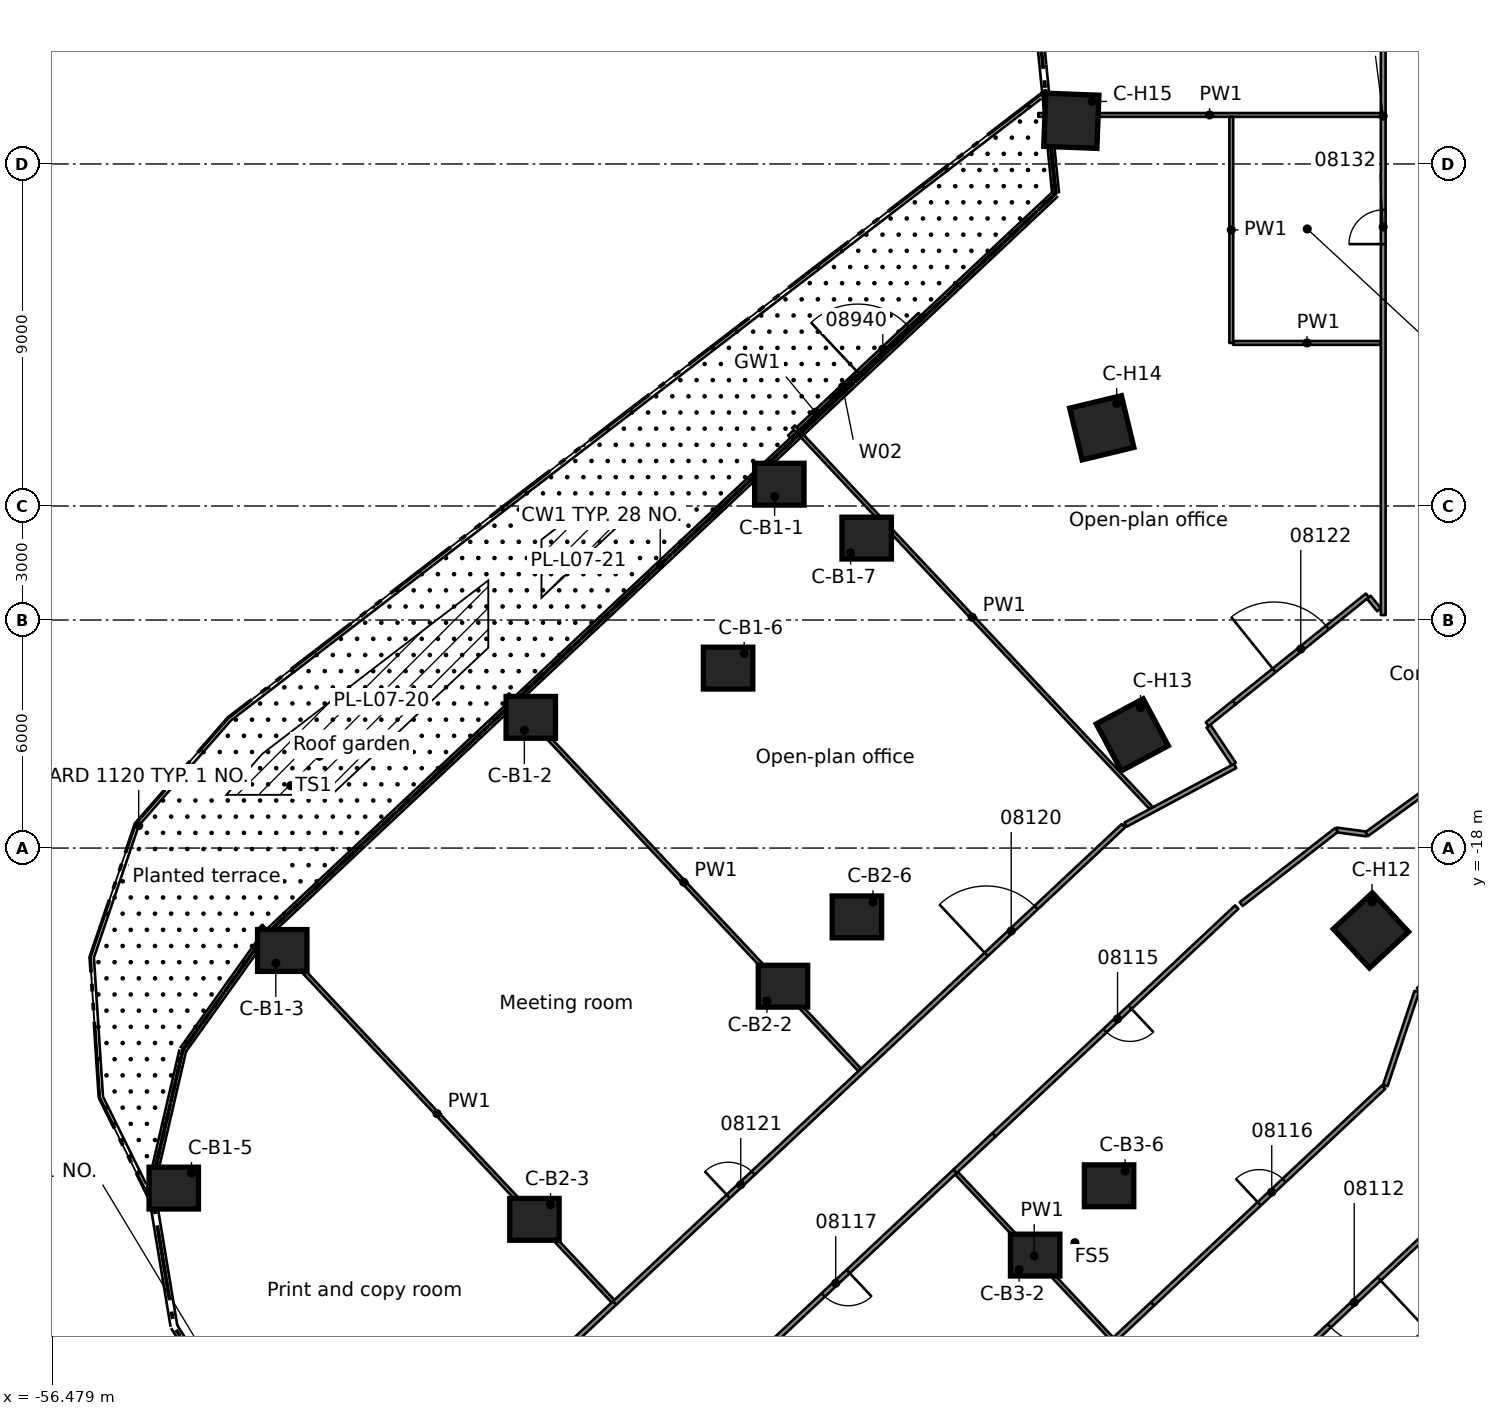
"""IFC4 building model, lengths in metres.
Left out: names, types, materials, properties, quantities, classifications, styles, units other than length and angle.
Written with IfcOpenShell. Run it as: python <this file> out.ifc"""

import sys

from ifc_helpers import new_model, si_unit, direction, frame, frame_2d, origin, origin_2d, place, context, subcontext, project, spatial, rectangle, extrude, element, fill, save


model = new_model("IFC4")
c1 = context("Model", 3, precision=1e-05, world=origin(), true_north=direction((0.0, 1.0)))
c2 = subcontext(c1, "Body", "Model", "MODEL_VIEW")
j1 = project(units=[si_unit("LENGTHUNIT", "METRE"), si_unit("PLANEANGLEUNIT", "RADIAN")], contexts=[c1])
p1 = place(None, origin())
s1 = spatial("IfcSite", under=j1, at=p1, CompositionType="ELEMENT")
p2 = place(p1, origin())
s2 = spatial("IfcBuilding", under=s1, at=p2, CompositionType="ELEMENT")
p3 = place(p2, frame((0.0, 0.0, 37.3)))
s3 = spatial("IfcBuildingStorey", under=s2, at=p3, CompositionType="ELEMENT", Elevation=37.3)
for number, where, z_axis, x_axis in (
    (1, (-37.341, -8.426, 0.0), (0.0, 0.0, 1.0), (1.0, 0.0, 0.0)),
    (2, (-43.881, -14.561, 0.0), (0.0, 0.0, 1.0), (1.0, 0.0, 0.0)),
    (3, (-50.421, -20.695, 0.0), (0.0, 0.0, 1.0), (1.0, 0.0, 0.0)),
    (4, (-53.276, -26.947, 0.0), (0.0, 0.0, 1.0), (1.0, 0.0, 0.0)),
    (5, (-38.689, -13.265, 0.0), (0.0, 0.0, 1.0), (1.0, 0.0, 0.0)),
    (6, (-35.042, -9.844, 0.0), (0.0, 0.0, 1.0), (1.0, 0.0, 0.0)),
    (7, (-37.245, -21.635, 0.0), (0.0, 0.0, 1.0), (1.0, 0.0, 0.0)),
    (8, (-43.785, -27.77, 0.0), (0.0, 0.0, 1.0), (1.0, 0.0, 0.0)),
    (9, (-35.3, -19.811, 0.0), (0.0, 0.0, 1.0), (1.0, 0.0, 0.0)),
    (10, (-30.609, -28.71, 0.0), (0.0, 0.0, 1.0), (1.0, 0.0, 0.0)),
    (11, (-28.664, -26.886, 0.0), (0.0, 0.0, 1.0), (1.0, 0.0, 0.0)),
):
    element("IfcColumn", number, at=place(p3, frame(where, z_axis=z_axis, x_axis=x_axis)), inside=s3, PredefinedType="COLUMN", context=c2, shape_type="SweptSolid", body=[
        extrude(rectangle(XDim=1.3, YDim=1.1, at=origin_2d()), origin(), (0.0, 0.0, 1.0), 3.5),
    ])
for number, where, z_axis, x_axis in (
    (12, (-21.774, -20.167, 0.0), (0.0, 0.0, 1.0), (-0.734, -0.68, 0.0)),
    (13, (-28.054, -15.021, 0.0), (0.0, 0.0, 1.0), (-0.882, -0.472, 0.0)),
    (14, (-28.856, -6.942, 0.0), (0.0, 0.0, 1.0), (-0.972, -0.234, 0.0)),
    (15, (-29.657, 1.136, 0.0), (0.0, 0.0, 1.0), (-0.999, 0.038, 0.0)),
):
    element("IfcColumn", number, at=place(p3, frame(where, z_axis=z_axis, x_axis=x_axis)), inside=s3, PredefinedType="COLUMN", context=c2, shape_type="SweptSolid", body=[
        extrude(rectangle(XDim=1.4, YDim=1.4, at=origin_2d()), origin(), (0.0, 0.0, 1.0), 3.5),
    ])
p4 = place(p3, frame((-37.077, -7.178, 0.0), z_axis=(0.0, 0.0, 1.0), x_axis=(0.729367283299, 0.684122332667, 0.0)))
e16 = element("IfcWall", 16, at=p4, inside=s3, PredefinedType="STANDARD", context=c2, shape_type="SweptSolid", body=[
    extrude(rectangle(XDim=4.705, YDim=0.1, at=frame_2d((2.353, 0.0))), origin(), (0.0, 0.0, 1.0), 3.08),
])
p5 = place(p4, frame((2.472, 0.0, 0.0)))
e17 = element("IfcOpeningElement", 17, at=p5, cuts=e16, PredefinedType="OPENING", context=c2, shape_type="SweptSolid", body=[
    extrude(rectangle(XDim=1.8, YDim=2.4, at=frame_2d((0.9, 1.2))), frame((0.0, 0.06, 0.0), z_axis=(0.0, -1.0, 0.0), x_axis=(1.0, 0.0, 0.0)), (0.0, 0.0, 1.0), 0.12),
])
p6 = place(p4, frame((1.472, 0.0, 0.0)))
e18 = element("IfcOpeningElement", 18, at=p6, cuts=e16, PredefinedType="OPENING", context=c2, shape_type="SweptSolid", body=[
    extrude(rectangle(XDim=0.9, YDim=2.4, at=frame_2d((0.45, 1.2))), frame((0.0, 0.06, 0.0), z_axis=(0.0, -1.0, 0.0), x_axis=(1.0, 0.0, 0.0)), (0.0, 0.0, 1.0), 0.12),
])
p7 = place(p3, frame((-25.382, -15.788, 0.0), z_axis=(0.0, 0.0, 1.0), x_axis=(-0.556395946592, 0.830917294691, 0.0)))
e19 = element("IfcWall", 19, at=p7, inside=s3, PredefinedType="PARTITIONING", context=c2, shape_type="SweptSolid", body=[
    extrude(rectangle(XDim=1.195, YDim=0.125, at=frame_2d((0.598, 0.0))), origin(), (0.0, 0.0, 1.0), 3.06),
])
p8 = place(p3, frame((-22.677, -17.524, 0.0), z_axis=(0.0, 0.0, 1.0), x_axis=(0.991054476668, -0.133457949465, 0.0)))
e20 = element("IfcWall", 20, at=p8, inside=s3, PredefinedType="PARTITIONING", context=c2, shape_type="SweptSolid", body=[
    extrude(rectangle(XDim=0.803, YDim=0.125, at=frame_2d((0.401, 0.0))), origin(), (0.0, 0.0, 1.0), 3.06),
])
p9 = place(p3, frame((-21.828, -11.401, 0.0), z_axis=(0.0, 0.0, 1.0), x_axis=(0.628685146217, -0.777659942987, 0.0)))
e21 = element("IfcWall", 21, at=p9, inside=s3, PredefinedType="PARTITIONING", context=c2, shape_type="SweptSolid", body=[
    extrude(rectangle(XDim=0.425, YDim=0.125, at=frame_2d((0.212, 0.0))), origin(), (0.0, 0.0, 1.0), 3.06),
])
p10 = place(p3, frame((-50.979, -20.052, 0.0), z_axis=(0.0, 0.0, 1.0), x_axis=(0.684137881392, -0.729352698798, 0.0)))
e22 = element("IfcWall", 22, at=p10, inside=s3, PredefinedType="PARTITIONING", context=c2, shape_type="SweptSolid", body=[
    extrude(rectangle(XDim=13.537, YDim=0.1, at=frame_2d((6.768, 0.0))), origin(), (0.0, 0.0, 1.0), 3.06),
])
p11 = place(p3, frame((-44.487, -13.963, 0.0), z_axis=(0.0, 0.0, 1.0), x_axis=(0.684099502381, -0.729388696678, 0.0)))
e23 = element("IfcWall", 23, at=p11, inside=s3, PredefinedType="PARTITIONING", context=c2, shape_type="SweptSolid", body=[
    extrude(rectangle(XDim=13.536, YDim=0.1, at=frame_2d((6.768, 0.0))), origin(), (0.0, 0.0, 1.0), 3.06),
])
p12 = place(p3, frame((-32.677, -26.556, 0.0), z_axis=(0.0, 0.0, 1.0), x_axis=(0.684221226116, -0.729274511918, 0.0)))
e24 = element("IfcWall", 24, at=p12, inside=s3, PredefinedType="PARTITIONING", context=c2, shape_type="SweptSolid", body=[
    extrude(rectangle(XDim=5.972, YDim=0.1, at=frame_2d((2.986, 0.0))), origin(), (0.0, 0.0, 1.0), 3.06),
])
p13 = place(p3, frame((-36.97, -6.912, 0.0), z_axis=(0.0, 0.0, 1.0), x_axis=(0.684169085262, -0.729323428098, 0.0)))
e25 = element("IfcWall", 25, at=p13, inside=s3, PredefinedType="PARTITIONING", context=c2, shape_type="SweptSolid", body=[
    extrude(rectangle(XDim=13.75, YDim=0.1, at=frame_2d((6.875, 0.0))), origin(), (0.0, 0.0, 1.0), 3.06),
])
p14 = place(p3, frame((-25.398, -4.709, 0.0), z_axis=(0.0, 0.0, 1.0), x_axis=(1.0, 0.0, 0.0)))
e26 = element("IfcWall", 26, at=p14, inside=s3, PredefinedType="PARTITIONING", context=c2, shape_type="SweptSolid", body=[
    extrude(rectangle(XDim=3.886, YDim=0.1, at=frame_2d((1.943, 0.0))), origin(), (0.0, 0.0, 1.0), 3.06),
])
p15 = place(p3, frame((-30.527, 1.29, 0.0), z_axis=(0.0, 0.0, 1.0), x_axis=(1.0, 0.0, 0.0)))
e27 = element("IfcWall", 27, at=p15, inside=s3, PredefinedType="PARTITIONING", context=c2, shape_type="SweptSolid", body=[
    extrude(rectangle(XDim=9.015, YDim=0.1, at=frame_2d((4.508, 0.0))), origin(), (0.0, 0.0, 1.0), 3.06),
])
p16 = place(p3, frame((-25.347, -15.84, 0.0), z_axis=(0.0, 0.0, 1.0), x_axis=(-0.881616399283, -0.471966656147, 0.0)))
e28 = element("IfcWall", 28, at=p16, inside=s3, PredefinedType="PARTITIONING", context=c2, shape_type="SweptSolid", body=[
    extrude(rectangle(XDim=3.271, YDim=0.125, at=frame_2d((1.636, 0.0))), origin(), (0.0, 0.0, 1.0), 3.06),
])
p17 = place(p3, frame((-25.187, -19.474, 0.0), z_axis=(0.0, 0.0, 1.0), x_axis=(0.789430829464, 0.613839527476, 0.0)))
e29 = element("IfcWall", 29, at=p17, inside=s3, PredefinedType="PARTITIONING", context=c2, shape_type="SweptSolid", body=[
    extrude(rectangle(XDim=3.177, YDim=0.125, at=frame_2d((1.588, 0.0))), origin(), (0.0, 0.0, 1.0), 3.06),
])
p18 = place(p3, frame((-25.373, -14.172, 0.0), z_axis=(0.0, 0.0, 1.0), x_axis=(0.779219787028, 0.626750766657, 0.0)))
e30 = element("IfcWall", 30, at=p18, inside=s3, PredefinedType="PARTITIONING", context=c2, shape_type="SweptSolid", body=[
    extrude(rectangle(XDim=4.5, YDim=0.125, at=frame_2d((2.25, 0.0))), origin(), (0.0, 0.0, 1.0), 3.06),
])
p19 = place(p18, frame((1.35, 0.0, 0.0)))
e31 = element("IfcOpeningElement", 31, at=p19, cuts=e30, PredefinedType="OPENING", context=c2, shape_type="SweptSolid", body=[
    extrude(rectangle(XDim=1.8, YDim=2.1, at=frame_2d((0.9, 1.05))), frame((0.0, 0.073, 0.0), z_axis=(0.0, -1.0, 0.0), x_axis=(1.0, 0.0, 0.0)), (0.0, 0.0, 1.0), 0.145),
])
p20 = place(p3, frame((-26.082, -14.742, 0.0), z_axis=(0.0, 0.0, 1.0), x_axis=(0.779030886705, 0.626985548127, 0.0)))
e32 = element("IfcWall", 32, at=p20, inside=s3, PredefinedType="PARTITIONING", context=c2, shape_type="SweptSolid", body=[
    extrude(rectangle(XDim=0.909, YDim=0.125, at=frame_2d((0.455, 0.0))), origin(), (0.0, 0.0, 1.0), 3.06),
])
p21 = place(p3, frame((-20.085, -16.326, 0.0), z_axis=(0.0, 0.0, 1.0), x_axis=(-0.80897376901, -0.587844742304, 0.0)))
e33 = element("IfcWall", 33, at=p21, inside=s3, PredefinedType="PARTITIONING", context=c2, shape_type="SweptSolid", body=[
    extrude(rectangle(XDim=2.22, YDim=0.125, at=frame_2d((1.11, 0.0))), origin(), (0.0, 0.0, 1.0), 3.06),
])
p22 = place(p3, frame((-20.522, -21.733, 0.0), z_axis=(0.0, 0.0, 1.0), x_axis=(0.733842634203, 0.679319503788, 0.0)))
e34 = element("IfcWall", 34, at=p22, inside=s3, PredefinedType="PARTITIONING", context=c2, shape_type="SweptSolid", body=[
    extrude(rectangle(XDim=2.145, YDim=0.125, at=frame_2d((1.072, 0.0))), origin(), (0.0, 0.0, 1.0), 3.06),
])
p23 = place(p3, frame((-32.72, -26.508, 0.0), z_axis=(0.0, 0.0, 1.0), x_axis=(0.729721133243, 0.683744884953, 0.0)))
e35 = element("IfcWall", 35, at=p23, inside=s3, PredefinedType="PARTITIONING", context=c2, shape_type="SweptSolid", body=[
    extrude(rectangle(XDim=1.407, YDim=0.125, at=frame_2d((0.704, 0.0))), origin(), (0.0, 0.0, 1.0), 3.06),
])
p24 = place(p3, frame((-18.566, -26.532, 0.0), z_axis=(0.0, 0.0, 1.0), x_axis=(-0.729338488461, -0.684153030578, 0.0)))
e36 = element("IfcWall", 36, at=p24, inside=s3, PredefinedType="PARTITIONING", context=c2, shape_type="SweptSolid", body=[
    extrude(rectangle(XDim=19.122, YDim=0.125, at=frame_2d((9.561, 0.0))), origin(), (0.0, 0.0, 1.0), 3.06),
])
p25 = place(p24, frame((4.101, 0.0, 0.0)))
e37 = element("IfcOpeningElement", 37, at=p25, cuts=e36, PredefinedType="OPENING", context=c2, shape_type="SweptSolid", body=[
    extrude(rectangle(XDim=1.8, YDim=2.1, at=frame_2d((0.9, 1.05))), frame((0.0, 0.073, 0.0), z_axis=(0.0, -1.0, 0.0), x_axis=(1.0, 0.0, 0.0)), (0.0, 0.0, 1.0), 0.145),
])
p26 = place(p24, frame((11.908, 0.0, 0.0)))
e38 = element("IfcOpeningElement", 38, at=p26, cuts=e36, PredefinedType="OPENING", context=c2, shape_type="SweptSolid", body=[
    extrude(rectangle(XDim=1.0, YDim=2.1, at=frame_2d((0.5, 1.05))), frame((0.0, 0.073, 0.0), z_axis=(0.0, -1.0, 0.0), x_axis=(1.0, 0.0, 0.0)), (0.0, 0.0, 1.0), 0.145),
])
p27 = place(p24, frame((16.357, 0.0, 0.0)))
e39 = element("IfcOpeningElement", 39, at=p27, cuts=e36, PredefinedType="OPENING", context=c2, shape_type="SweptSolid", body=[
    extrude(rectangle(XDim=1.0, YDim=2.1, at=frame_2d((0.5, 1.05))), frame((0.0, 0.073, 0.0), z_axis=(0.0, -1.0, 0.0), x_axis=(1.0, 0.0, 0.0)), (0.0, 0.0, 1.0), 0.145),
])
p28 = place(p3, frame((-36.715, -38.619, 0.0), z_axis=(0.0, 0.0, 1.0), x_axis=(0.729354194338, 0.684136287008, 0.0)))
e40 = element("IfcWall", 40, at=p28, inside=s3, PredefinedType="PARTITIONING", context=c2, shape_type="SweptSolid", body=[
    extrude(rectangle(XDim=12.607, YDim=0.125, at=frame_2d((6.304, 0.0))), origin(), (0.0, 0.0, 1.0), 3.06),
])
p29 = place(p3, frame((-27.52, -29.994, 0.0), z_axis=(0.0, 0.0, 1.0), x_axis=(0.729427587213, 0.684058034828, 0.0)))
e41 = element("IfcWall", 41, at=p29, inside=s3, PredefinedType="PARTITIONING", context=c2, shape_type="SweptSolid", body=[
    extrude(rectangle(XDim=8.335, YDim=0.125, at=frame_2d((4.168, 0.0))), origin(), (0.0, 0.0, 1.0), 3.06),
])
p30 = place(p29, frame((3.85, 0.0, 0.0)))
e42 = element("IfcOpeningElement", 42, at=p30, cuts=e41, PredefinedType="OPENING", context=c2, shape_type="SweptSolid", body=[
    extrude(rectangle(XDim=0.9, YDim=2.1, at=frame_2d((0.45, 1.05))), frame((0.0, 0.073, 0.0), z_axis=(0.0, -1.0, 0.0), x_axis=(1.0, 0.0, 0.0)), (0.0, 0.0, 1.0), 0.145),
])
p31 = place(p3, frame((-32.721, -26.509, 0.0), z_axis=(0.0, 0.0, 1.0), x_axis=(-0.729399894654, -0.684087562874, 0.0)))
e43 = element("IfcWall", 43, at=p31, inside=s3, PredefinedType="PARTITIONING", context=c2, shape_type="SweptSolid", body=[
    extrude(rectangle(XDim=8.54, YDim=0.125, at=frame_2d((4.27, 0.0))), origin(), (0.0, 0.0, 1.0), 3.06),
])
p32 = place(p31, frame((3.85, 0.0, 0.0)))
e44 = element("IfcOpeningElement", 44, at=p32, cuts=e43, PredefinedType="OPENING", context=c2, shape_type="SweptSolid", body=[
    extrude(rectangle(XDim=0.9, YDim=2.1, at=frame_2d((0.45, 1.05))), frame((0.0, 0.073, 0.0), z_axis=(0.0, -1.0, 0.0), x_axis=(1.0, 0.0, 0.0)), (0.0, 0.0, 1.0), 0.145),
])
p33 = place(p3, frame((-25.305, -19.554, 0.0), z_axis=(0.0, 0.0, 1.0), x_axis=(-0.729365065932, -0.684124696674, 0.0)))
e45 = element("IfcWall", 45, at=p33, inside=s3, PredefinedType="PARTITIONING", context=c2, shape_type="SweptSolid", body=[
    extrude(rectangle(XDim=8.759, YDim=0.125, at=frame_2d((4.379, 0.0))), origin(), (0.0, 0.0, 1.0), 3.06),
])
p34 = place(p33, frame((3.85, 0.0, 0.0)))
e46 = element("IfcOpeningElement", 46, at=p34, cuts=e45, PredefinedType="OPENING", context=c2, shape_type="SweptSolid", body=[
    extrude(rectangle(XDim=0.9, YDim=2.1, at=frame_2d((0.45, 1.05))), frame((0.0, 0.073, 0.0), z_axis=(0.0, -1.0, 0.0), x_axis=(1.0, 0.0, 0.0)), (0.0, 0.0, 1.0), 0.145),
])
p35 = place(p3, frame((-45.978, -34.007, 0.0), z_axis=(0.0, 0.0, 1.0), x_axis=(0.72936038077, 0.684129691625, 0.0)))
e47 = element("IfcWall", 47, at=p35, inside=s3, PredefinedType="PARTITIONING", context=c2, shape_type="SweptSolid", body=[
    extrude(rectangle(XDim=5.9, YDim=0.125, at=frame_2d((2.95, 0.0))), origin(), (0.0, 0.0, 1.0), 3.06),
])
p36 = place(p3, frame((-41.675, -29.971, 0.0), z_axis=(0.0, 0.0, 1.0), x_axis=(0.729357568135, 0.684132690203, 0.0)))
e48 = element("IfcWall", 48, at=p36, inside=s3, PredefinedType="PARTITIONING", context=c2, shape_type="SweptSolid", body=[
    extrude(rectangle(XDim=18.354, YDim=0.125, at=frame_2d((9.177, 0.0))), origin(), (0.0, 0.0, 1.0), 3.06),
])
p37 = place(p36, frame((13.408, 0.0, 0.0)))
e49 = element("IfcOpeningElement", 49, at=p37, cuts=e48, PredefinedType="OPENING", context=c2, shape_type="SweptSolid", body=[
    extrude(rectangle(XDim=1.8, YDim=2.1, at=frame_2d((0.9, 1.05))), frame((0.0, 0.073, 0.0), z_axis=(0.0, -1.0, 0.0), x_axis=(1.0, 0.0, 0.0)), (0.0, 0.0, 1.0), 0.145),
])
p38 = place(p36, frame((4.1, 0.0, 0.0)))
e50 = element("IfcOpeningElement", 50, at=p38, cuts=e48, PredefinedType="OPENING", context=c2, shape_type="SweptSolid", body=[
    extrude(rectangle(XDim=0.9, YDim=2.1, at=frame_2d((0.45, 1.05))), frame((0.0, 0.073, 0.0), z_axis=(0.0, -1.0, 0.0), x_axis=(1.0, 0.0, 0.0)), (0.0, 0.0, 1.0), 0.145),
])
p39 = place(p3, frame((-20.568, -21.776, 0.0), z_axis=(0.0, 0.0, 1.0), x_axis=(-0.316873991938, -0.948467644801, 0.0)))
e51 = element("IfcWall", 51, at=p39, inside=s3, PredefinedType="PARTITIONING", context=c2, shape_type="SweptSolid", body=[
    extrude(rectangle(XDim=2.606, YDim=0.125, at=frame_2d((1.303, 0.0))), origin(), (0.0, 0.0, 1.0), 3.06),
])
p40 = place(p3, frame((-21.45, -11.869, 0.0), z_axis=(0.0, 0.0, 1.0), x_axis=(0.0, 1.0, 0.0)))
e52 = element("IfcWall", 52, at=p40, inside=s3, PredefinedType="PARTITIONING", context=c2, shape_type="SweptSolid", body=[
    extrude(rectangle(XDim=26.255, YDim=0.125, at=frame_2d((13.127, 0.0))), origin(), (0.0, 0.0, 1.0), 3.06),
])
p41 = place(p40, frame((9.76, 0.0, 0.0)))
e53 = element("IfcOpeningElement", 53, at=p41, cuts=e52, PredefinedType="OPENING", context=c2, shape_type="SweptSolid", body=[
    extrude(rectangle(XDim=0.9, YDim=2.1, at=frame_2d((0.45, 1.05))), frame((0.0, 0.073, 0.0), z_axis=(0.0, -1.0, 0.0), x_axis=(1.0, 0.0, 0.0)), (0.0, 0.0, 1.0), 0.145),
])
p42 = place(p40, frame((22.668, 0.0, 0.0)))
e54 = element("IfcOpeningElement", 54, at=p42, cuts=e52, PredefinedType="OPENING", context=c2, shape_type="SweptSolid", body=[
    extrude(rectangle(XDim=1.1, YDim=2.1, at=frame_2d((0.55, 1.05))), frame((0.0, 0.073, 0.0), z_axis=(0.0, -1.0, 0.0), x_axis=(1.0, 0.0, 0.0)), (0.0, 0.0, 1.0), 0.145),
])
p43 = place(p3, frame((-25.448, -4.709, 0.0), z_axis=(0.0, 0.0, 1.0), x_axis=(0.0, 1.0, 0.0)))
e55 = element("IfcWall", 55, at=p43, inside=s3, PredefinedType="PARTITIONING", context=c2, shape_type="SweptSolid", body=[
    extrude(rectangle(XDim=5.949, YDim=0.1, at=frame_2d((2.975, 0.0))), origin(), (0.0, 0.0, 1.0), 3.06),
])
p44 = place(p5, origin())
e56 = element("IfcDoor", 56, at=p44, inside=s3, OperationType="DOUBLE_DOOR_SINGLE_SWING", PredefinedType="DOOR", context=c2, shape_type="SweptSolid", body=[
    extrude(rectangle(XDim=1.8, YDim=2.4, at=frame_2d((0.9, 1.2))), frame((0.0, 0.025, 0.0), z_axis=(0.0, -1.0, 0.0), x_axis=(1.0, 0.0, 0.0)), (0.0, 0.0, 1.0), 0.05),
])
fill(e17, e56)
p45 = place(p6, origin())
e57 = element("IfcWindow", 57, at=p45, inside=s3, PartitioningType="SINGLE_PANEL", PredefinedType="WINDOW", context=c2, shape_type="SweptSolid", body=[
    extrude(rectangle(XDim=0.9, YDim=2.4, at=frame_2d((0.45, 1.2))), frame((0.0, 0.03, 0.0), z_axis=(0.0, -1.0, 0.0), x_axis=(1.0, 0.0, 0.0)), (0.0, 0.0, 1.0), 0.06),
])
fill(e18, e57)
p46 = place(p25, origin())
e58 = element("IfcDoor", 58, at=p46, inside=s3, OperationType="DOUBLE_DOOR_SINGLE_SWING", PredefinedType="DOOR", context=c2, shape_type="SweptSolid", body=[
    extrude(rectangle(XDim=1.8, YDim=2.1, at=frame_2d((0.9, 1.05))), frame((0.0, 0.025, 0.0), z_axis=(0.0, -1.0, 0.0), x_axis=(1.0, 0.0, 0.0)), (0.0, 0.0, 1.0), 0.05),
])
fill(e37, e58)
p47 = place(p34, origin())
e59 = element("IfcDoor", 59, at=p47, inside=s3, OperationType="SINGLE_SWING_LEFT", PredefinedType="DOOR", context=c2, shape_type="SweptSolid", body=[
    extrude(rectangle(XDim=0.9, YDim=2.1, at=frame_2d((0.45, 1.05))), frame((0.0, 0.025, 0.0), z_axis=(0.0, -1.0, 0.0), x_axis=(1.0, 0.0, 0.0)), (0.0, 0.0, 1.0), 0.05),
])
fill(e46, e59)
p48 = place(p30, origin())
e60 = element("IfcDoor", 60, at=p48, inside=s3, OperationType="SINGLE_SWING_RIGHT", PredefinedType="DOOR", context=c2, shape_type="SweptSolid", body=[
    extrude(rectangle(XDim=0.9, YDim=2.1, at=frame_2d((0.45, 1.05))), frame((0.0, 0.025, 0.0), z_axis=(0.0, -1.0, 0.0), x_axis=(1.0, 0.0, 0.0)), (0.0, 0.0, 1.0), 0.05),
])
fill(e42, e60)
p49 = place(p32, origin())
e61 = element("IfcDoor", 61, at=p49, inside=s3, OperationType="SINGLE_SWING_RIGHT", PredefinedType="DOOR", context=c2, shape_type="SweptSolid", body=[
    extrude(rectangle(XDim=0.9, YDim=2.1, at=frame_2d((0.45, 1.05))), frame((0.0, 0.025, 0.0), z_axis=(0.0, -1.0, 0.0), x_axis=(1.0, 0.0, 0.0)), (0.0, 0.0, 1.0), 0.05),
])
fill(e44, e61)
p50 = place(p37, origin())
e62 = element("IfcDoor", 62, at=p50, inside=s3, OperationType="DOUBLE_DOOR_SINGLE_SWING", PredefinedType="DOOR", context=c2, shape_type="SweptSolid", body=[
    extrude(rectangle(XDim=1.8, YDim=2.1, at=frame_2d((0.9, 1.05))), frame((0.0, 0.025, 0.0), z_axis=(0.0, -1.0, 0.0), x_axis=(1.0, 0.0, 0.0)), (0.0, 0.0, 1.0), 0.05),
])
fill(e49, e62)
p51 = place(p38, origin())
e63 = element("IfcDoor", 63, at=p51, inside=s3, OperationType="SINGLE_SWING_LEFT", PredefinedType="DOOR", context=c2, shape_type="SweptSolid", body=[
    extrude(rectangle(XDim=0.9, YDim=2.1, at=frame_2d((0.45, 1.05))), frame((0.0, 0.025, 0.0), z_axis=(0.0, -1.0, 0.0), x_axis=(1.0, 0.0, 0.0)), (0.0, 0.0, 1.0), 0.05),
])
fill(e50, e63)
p52 = place(p19, origin())
e64 = element("IfcDoor", 64, at=p52, inside=s3, OperationType="DOUBLE_DOOR_SINGLE_SWING", PredefinedType="DOOR", context=c2, shape_type="SweptSolid", body=[
    extrude(rectangle(XDim=1.8, YDim=2.1, at=frame_2d((0.9, 1.05))), frame((0.0, 0.025, 0.0), z_axis=(0.0, -1.0, 0.0), x_axis=(1.0, 0.0, 0.0)), (0.0, 0.0, 1.0), 0.05),
])
fill(e31, e64)
p53 = place(p41, origin())
e65 = element("IfcDoor", 65, at=p53, inside=s3, OperationType="SINGLE_SWING_LEFT", PredefinedType="DOOR", context=c2, shape_type="SweptSolid", body=[
    extrude(rectangle(XDim=0.9, YDim=2.1, at=frame_2d((0.45, 1.05))), frame((0.0, 0.025, 0.0), z_axis=(0.0, -1.0, 0.0), x_axis=(1.0, 0.0, 0.0)), (0.0, 0.0, 1.0), 0.05),
])
fill(e53, e65)
save(model, sys.argv[1])
